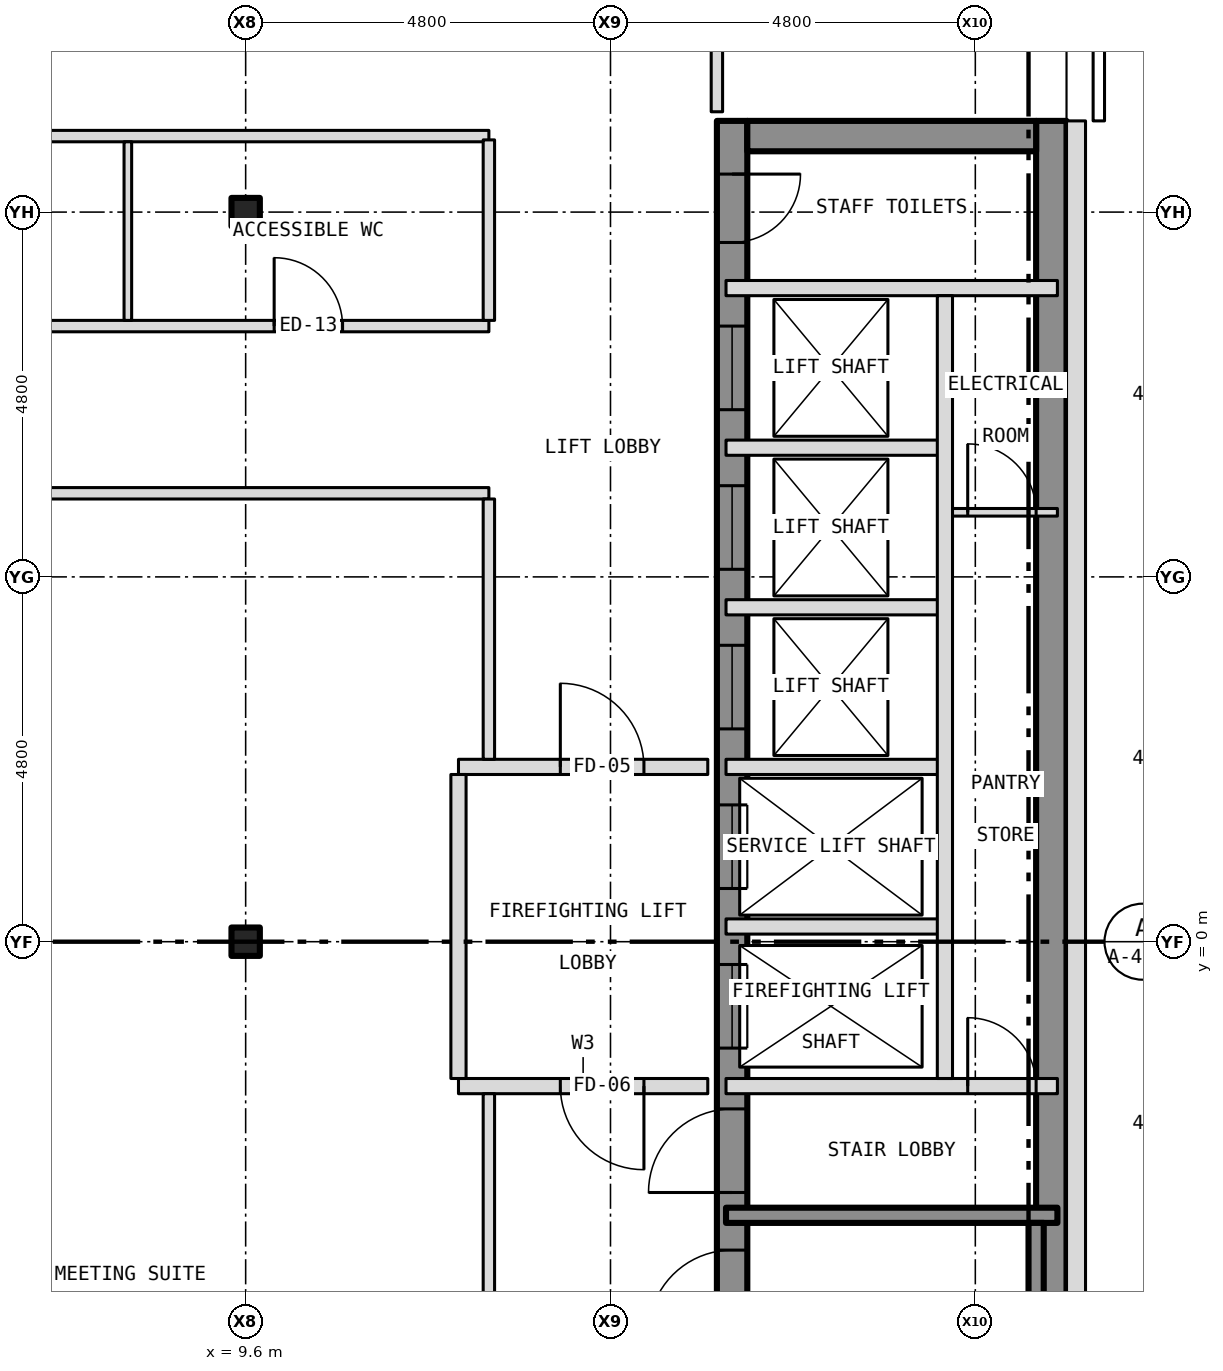
"""IFC4 building model, lengths in metres.
Left out: names, types, materials, properties, quantities, classifications, styles, units other than length and angle.
Written with IfcOpenShell. Run it as: python <this file> out.ifc"""

import sys

from ifc_helpers import new_model, si_unit, direction, frame, frame_2d, origin, origin_2d, place, context, subcontext, project, spatial, rectangle, i_section, extrude, element, fill, save


model = new_model("IFC4")
c1 = context("Model", 3, precision=1e-05, world=origin(), true_north=direction((0.0, 1.0)))
c2 = subcontext(c1, "Body", "Model", "MODEL_VIEW")
j1 = project(units=[si_unit("LENGTHUNIT", "METRE"), si_unit("PLANEANGLEUNIT", "RADIAN")], contexts=[c1])
p1 = place(None, origin())
s1 = spatial("IfcSite", under=j1, at=p1, CompositionType="ELEMENT")
p2 = place(p1, origin())
s2 = spatial("IfcBuilding", under=s1, at=p2, CompositionType="ELEMENT")
p3 = place(p2, frame((0.0, 0.0, 212.0)))
s3 = spatial("IfcBuildingStorey", under=s2, at=p3, CompositionType="ELEMENT", Elevation=212.0)
for number, where, z_axis, x_axis in (
    (1, (9.6, 0.0, -0.15), (0.0, 0.0, 1.0), (1.0, 0.0, 0.0)),
    (2, (9.6, 9.6, -0.15), (0.0, 0.0, 1.0), (1.0, 0.0, 0.0)),
):
    element("IfcColumn", number, at=place(p3, frame(where, z_axis=z_axis, x_axis=x_axis)), inside=s3, PredefinedType="COLUMN", context=c2, shape_type="SweptSolid", body=[
        extrude(i_section(OverallWidth=0.373, OverallDepth=0.373, WebThickness=0.016, FlangeThickness=0.026, at=origin_2d()), origin(), (0.0, 0.0, 1.0), 3.5),
    ])
p4 = place(p3, frame((16.0, -10.8, 0.0), z_axis=(0.0, 0.0, 1.0), x_axis=(0.0, 1.0, 0.0)))
e3 = element("IfcWall", 3, at=p4, inside=s3, PredefinedType="SHEAR", context=c2, shape_type="SweptSolid", body=[
    extrude(rectangle(XDim=21.6, YDim=0.4, at=frame_2d((10.8, 0.0))), origin(), (0.0, 0.0, 1.0), 3.25),
])
p5 = place(p4, frame((9.4, 0.0, 0.0)))
e4 = element("IfcOpeningElement", 4, at=p5, cuts=e3, PredefinedType="OPENING", context=c2, shape_type="SweptSolid", body=[
    extrude(rectangle(XDim=1.1, YDim=2.1, at=frame_2d((0.55, 1.05))), frame((0.0, 0.212, 0.0), z_axis=(0.0, -1.0, 0.0), x_axis=(1.0, 0.0, 0.0)), (0.0, 0.0, 1.0), 0.424),
])
p6 = place(p4, frame((11.5, 0.0, 0.0)))
e5 = element("IfcOpeningElement", 5, at=p6, cuts=e3, PredefinedType="OPENING", context=c2, shape_type="SweptSolid", body=[
    extrude(rectangle(XDim=1.1, YDim=2.1, at=frame_2d((0.55, 1.05))), frame((0.0, 0.212, 0.0), z_axis=(0.0, -1.0, 0.0), x_axis=(1.0, 0.0, 0.0)), (0.0, 0.0, 1.0), 0.424),
])
p7 = place(p4, frame((13.6, 0.0, 0.0)))
e6 = element("IfcOpeningElement", 6, at=p7, cuts=e3, PredefinedType="OPENING", context=c2, shape_type="SweptSolid", body=[
    extrude(rectangle(XDim=1.1, YDim=2.1, at=frame_2d((0.55, 1.05))), frame((0.0, 0.212, 0.0), z_axis=(0.0, -1.0, 0.0), x_axis=(1.0, 0.0, 0.0)), (0.0, 0.0, 1.0), 0.424),
])
p8 = place(p4, frame((15.7, 0.0, 0.0)))
e7 = element("IfcOpeningElement", 7, at=p8, cuts=e3, PredefinedType="OPENING", context=c2, shape_type="SweptSolid", body=[
    extrude(rectangle(XDim=1.1, YDim=2.1, at=frame_2d((0.55, 1.05))), frame((0.0, 0.212, 0.0), z_axis=(0.0, -1.0, 0.0), x_axis=(1.0, 0.0, 0.0)), (0.0, 0.0, 1.0), 0.424),
])
p9 = place(p4, frame((17.8, 0.0, 0.0)))
e8 = element("IfcOpeningElement", 8, at=p9, cuts=e3, PredefinedType="OPENING", context=c2, shape_type="SweptSolid", body=[
    extrude(rectangle(XDim=1.1, YDim=2.1, at=frame_2d((0.55, 1.05))), frame((0.0, 0.212, 0.0), z_axis=(0.0, -1.0, 0.0), x_axis=(1.0, 0.0, 0.0)), (0.0, 0.0, 1.0), 0.424),
])
p10 = place(p4, frame((5.642, 0.0, 0.0)))
e9 = element("IfcOpeningElement", 9, at=p10, cuts=e3, PredefinedType="OPENING", context=c2, shape_type="SweptSolid", body=[
    extrude(rectangle(XDim=1.1, YDim=2.1, at=frame_2d((0.55, 1.05))), frame((0.0, 0.212, 0.0), z_axis=(0.0, -1.0, 0.0), x_axis=(1.0, 0.0, 0.0)), (0.0, 0.0, 1.0), 0.424),
])
p11 = place(p4, frame((7.5, 0.0, 0.0)))
e10 = element("IfcOpeningElement", 10, at=p11, cuts=e3, PredefinedType="OPENING", context=c2, shape_type="SweptSolid", body=[
    extrude(rectangle(XDim=1.1, YDim=2.1, at=frame_2d((0.55, 1.05))), frame((0.0, 0.212, 0.0), z_axis=(0.0, -1.0, 0.0), x_axis=(1.0, 0.0, 0.0)), (0.0, 0.0, 1.0), 0.424),
])
p12 = place(p4, frame((20.0, 0.0, 0.0)))
e11 = element("IfcOpeningElement", 11, at=p12, cuts=e3, PredefinedType="OPENING", context=c2, shape_type="SweptSolid", body=[
    extrude(rectangle(XDim=0.9, YDim=2.1, at=frame_2d((0.45, 1.05))), frame((0.0, 0.212, 0.0), z_axis=(0.0, -1.0, 0.0), x_axis=(1.0, 0.0, 0.0)), (0.0, 0.0, 1.0), 0.424),
])
p13 = place(p3, frame((20.2, -10.8, 0.0), z_axis=(0.0, 0.0, 1.0), x_axis=(0.0, 1.0, 0.0)))
e12 = element("IfcWall", 12, at=p13, inside=s3, PredefinedType="SHEAR", context=c2, shape_type="SweptSolid", body=[
    extrude(rectangle(XDim=21.6, YDim=0.4, at=frame_2d((10.8, 0.0))), origin(), (0.0, 0.0, 1.0), 3.25),
])
p14 = place(p3, frame((16.2, 10.6, 0.0), z_axis=(0.0, 0.0, 1.0), x_axis=(1.0, 0.0, 0.0)))
e13 = element("IfcWall", 13, at=p14, inside=s3, PredefinedType="SHEAR", context=c2, shape_type="SweptSolid", body=[
    extrude(rectangle(XDim=3.8, YDim=0.4, at=frame_2d((1.9, 0.0))), origin(), (0.0, 0.0, 1.0), 3.25),
])
p15 = place(p3, frame((20.525, -10.8, 0.0), z_axis=(0.0, 0.0, 1.0), x_axis=(0.0, 1.0, 0.0)))
e14 = element("IfcWall", 14, at=p15, inside=s3, PredefinedType="SOLIDWALL", context=c2, shape_type="SweptSolid", body=[
    extrude(rectangle(XDim=21.6, YDim=0.25, at=frame_2d((10.8, 0.0))), origin(), (0.0, 0.0, 1.0), 3.5),
])
p16 = place(p15, frame((2.95, 0.0, 1.0)))
e15 = element("IfcOpeningElement", 15, at=p16, cuts=e14, PredefinedType="OPENING", context=c2, shape_type="SweptSolid", body=[
    extrude(rectangle(XDim=0.6, YDim=1.5, at=frame_2d((0.3, 0.75))), frame((0.0, 0.137, 0.0), z_axis=(0.0, -1.0, 0.0), x_axis=(1.0, 0.0, 0.0)), (0.0, 0.0, 1.0), 0.274),
])
p17 = place(p3, frame((15.92, -3.6, 0.0), z_axis=(0.0, 0.0, 1.0), x_axis=(1.0, 0.0, 0.0)))
e16 = element("IfcWall", 16, at=p17, inside=s3, PredefinedType="SHEAR", context=c2, shape_type="SweptSolid", body=[
    extrude(rectangle(XDim=4.36, YDim=0.2, at=frame_2d((2.18, 0.0))), origin(), (0.0, 0.0, 1.0), 3.25),
])
p18 = place(p3, frame((12.4, -1.9, 0.0), z_axis=(0.0, 0.0, 1.0), x_axis=(1.0, 0.0, 0.0)))
e17 = element("IfcWall", 17, at=p18, inside=s3, PredefinedType="PARTITIONING", context=c2, shape_type="SweptSolid", body=[
    extrude(rectangle(XDim=3.28, YDim=0.2, at=frame_2d((1.64, 0.0))), origin(), (0.0, 0.0, 1.0), 3.35),
])
p19 = place(p18, frame((1.34, 0.0, 0.0)))
e18 = element("IfcOpeningElement", 18, at=p19, cuts=e17, PredefinedType="OPENING", context=c2, shape_type="SweptSolid", body=[
    extrude(rectangle(XDim=1.1, YDim=2.1, at=frame_2d((0.55, 1.05))), frame((0.0, 0.112, 0.0), z_axis=(0.0, -1.0, 0.0), x_axis=(1.0, 0.0, 0.0)), (0.0, 0.0, 1.0), 0.224),
])
p20 = place(p3, frame((15.92, -1.9, 0.0), z_axis=(0.0, 0.0, 1.0), x_axis=(1.0, 0.0, 0.0)))
e19 = element("IfcWall", 19, at=p20, inside=s3, PredefinedType="PARTITIONING", context=c2, shape_type="SweptSolid", body=[
    extrude(rectangle(XDim=4.36, YDim=0.2, at=frame_2d((2.18, 0.0))), origin(), (0.0, 0.0, 1.0), 3.25),
])
p21 = place(p20, frame((3.18, 0.0, 0.0)))
e20 = element("IfcOpeningElement", 20, at=p21, cuts=e19, PredefinedType="OPENING", context=c2, shape_type="SweptSolid", body=[
    extrude(rectangle(XDim=0.9, YDim=2.1, at=frame_2d((0.45, 1.05))), frame((0.0, 0.112, 0.0), z_axis=(0.0, -1.0, 0.0), x_axis=(1.0, 0.0, 0.0)), (0.0, 0.0, 1.0), 0.224),
])
p22 = place(p3, frame((15.92, 0.2, 0.0), z_axis=(0.0, 0.0, 1.0), x_axis=(1.0, 0.0, 0.0)))
e21 = element("IfcWall", 21, at=p22, inside=s3, PredefinedType="PARTITIONING", context=c2, shape_type="SweptSolid", body=[
    extrude(rectangle(XDim=2.88, YDim=0.2, at=frame_2d((1.44, 0.0))), origin(), (0.0, 0.0, 1.0), 3.25),
])
p23 = place(p3, frame((12.4, 2.3, 0.0), z_axis=(0.0, 0.0, 1.0), x_axis=(1.0, 0.0, 0.0)))
e22 = element("IfcWall", 22, at=p23, inside=s3, PredefinedType="PARTITIONING", context=c2, shape_type="SweptSolid", body=[
    extrude(rectangle(XDim=3.28, YDim=0.2, at=frame_2d((1.64, 0.0))), origin(), (0.0, 0.0, 1.0), 3.35),
])
p24 = place(p23, frame((1.34, 0.0, 0.0)))
e23 = element("IfcOpeningElement", 23, at=p24, cuts=e22, PredefinedType="OPENING", context=c2, shape_type="SweptSolid", body=[
    extrude(rectangle(XDim=1.1, YDim=2.1, at=frame_2d((0.55, 1.05))), frame((0.0, 0.112, 0.0), z_axis=(0.0, -1.0, 0.0), x_axis=(1.0, 0.0, 0.0)), (0.0, 0.0, 1.0), 0.224),
])
for number, where, z_axis, x_axis in (
    (24, (15.92, 2.3, 0.0), (0.0, 0.0, 1.0), (1.0, 0.0, 0.0)),
    (25, (15.92, 4.4, 0.0), (0.0, 0.0, 1.0), (1.0, 0.0, 0.0)),
):
    element("IfcWall", number, at=place(p3, frame(where, z_axis=z_axis, x_axis=x_axis)), inside=s3, PredefinedType="PARTITIONING", context=c2, shape_type="SweptSolid", body=[
        extrude(rectangle(XDim=2.88, YDim=0.2, at=frame_2d((1.44, 0.0))), origin(), (0.0, 0.0, 1.0), 3.25),
    ])
p25 = place(p3, frame((18.8, 5.65, 0.0), z_axis=(0.0, 0.0, 1.0), x_axis=(1.0, 0.0, 0.0)))
e26 = element("IfcWall", 26, at=p25, inside=s3, PredefinedType="PARTITIONING", context=c2, shape_type="SweptSolid", body=[
    extrude(rectangle(XDim=1.48, YDim=0.1, at=frame_2d((0.74, 0.0))), origin(), (0.0, 0.0, 1.0), 3.25),
])
p26 = place(p25, frame((0.3, 0.0, 0.0)))
e27 = element("IfcOpeningElement", 27, at=p26, cuts=e26, PredefinedType="OPENING", context=c2, shape_type="SweptSolid", body=[
    extrude(rectangle(XDim=0.9, YDim=2.1, at=frame_2d((0.45, 1.05))), frame((0.0, 0.062, 0.0), z_axis=(0.0, -1.0, 0.0), x_axis=(1.0, 0.0, 0.0)), (0.0, 0.0, 1.0), 0.124),
])
p27 = place(p3, frame((3.3, 5.9, 0.0), z_axis=(0.0, 0.0, 1.0), x_axis=(1.0, 0.0, 0.0)))
e28 = element("IfcWall", 28, at=p27, inside=s3, PredefinedType="PARTITIONING", context=c2, shape_type="SweptSolid", body=[
    extrude(rectangle(XDim=9.5, YDim=0.15, at=frame_2d((4.75, 0.0))), origin(), (0.0, 0.0, 1.0), 3.35),
])
p28 = place(p3, frame((15.92, 6.5, 0.0), z_axis=(0.0, 0.0, 1.0), x_axis=(1.0, 0.0, 0.0)))
e29 = element("IfcWall", 29, at=p28, inside=s3, PredefinedType="PARTITIONING", context=c2, shape_type="SweptSolid", body=[
    extrude(rectangle(XDim=2.88, YDim=0.2, at=frame_2d((1.44, 0.0))), origin(), (0.0, 0.0, 1.0), 3.25),
])
p29 = place(p3, frame((3.3, 8.1, 0.0), z_axis=(0.0, 0.0, 1.0), x_axis=(1.0, 0.0, 0.0)))
e30 = element("IfcWall", 30, at=p29, inside=s3, PredefinedType="PARTITIONING", context=c2, shape_type="SweptSolid", body=[
    extrude(rectangle(XDim=9.5, YDim=0.15, at=frame_2d((4.75, 0.0))), origin(), (0.0, 0.0, 1.0), 3.35),
])
p30 = place(p29, frame((6.675, 0.0, 0.0)))
e31 = element("IfcOpeningElement", 31, at=p30, cuts=e30, PredefinedType="OPENING", context=c2, shape_type="SweptSolid", body=[
    extrude(rectangle(XDim=0.9, YDim=2.1, at=frame_2d((0.45, 1.05))), frame((0.0, 0.087, 0.0), z_axis=(0.0, -1.0, 0.0), x_axis=(1.0, 0.0, 0.0)), (0.0, 0.0, 1.0), 0.174),
])
p31 = place(p3, frame((15.92, 8.6, 0.0), z_axis=(0.0, 0.0, 1.0), x_axis=(1.0, 0.0, 0.0)))
e32 = element("IfcWall", 32, at=p31, inside=s3, PredefinedType="PARTITIONING", context=c2, shape_type="SweptSolid", body=[
    extrude(rectangle(XDim=4.36, YDim=0.2, at=frame_2d((2.18, 0.0))), origin(), (0.0, 0.0, 1.0), 3.25),
])
p32 = place(p3, frame((3.3, 10.6, 0.0), z_axis=(0.0, 0.0, 1.0), x_axis=(1.0, 0.0, 0.0)))
e33 = element("IfcWall", 33, at=p32, inside=s3, PredefinedType="PARTITIONING", context=c2, shape_type="SweptSolid", body=[
    extrude(rectangle(XDim=9.5, YDim=0.15, at=frame_2d((4.75, 0.0))), origin(), (0.0, 0.0, 1.0), 3.35),
])
p33 = place(p32, frame((1.925, 0.0, 0.0)))
e34 = element("IfcOpeningElement", 34, at=p33, cuts=e33, PredefinedType="OPENING", context=c2, shape_type="SweptSolid", body=[
    extrude(rectangle(XDim=0.9, YDim=2.1, at=frame_2d((0.45, 1.05))), frame((0.0, 0.087, 0.0), z_axis=(0.0, -1.0, 0.0), x_axis=(1.0, 0.0, 0.0)), (0.0, 0.0, 1.0), 0.174),
])
p34 = place(p3, frame((8.05, 8.175, 0.0), z_axis=(0.0, 0.0, 1.0), x_axis=(0.0, 1.0, 0.0)))
e35 = element("IfcWall", 35, at=p34, inside=s3, PredefinedType="PARTITIONING", context=c2, shape_type="SweptSolid", body=[
    extrude(rectangle(XDim=2.35, YDim=0.1, at=frame_2d((1.175, 0.0))), origin(), (0.0, 0.0, 1.0), 3.35),
])
p35 = place(p3, frame((12.4, -1.8, 0.0), z_axis=(0.0, 0.0, 1.0), x_axis=(0.0, 1.0, 0.0)))
e36 = element("IfcWall", 36, at=p35, inside=s3, PredefinedType="PARTITIONING", context=c2, shape_type="SweptSolid", body=[
    extrude(rectangle(XDim=4.0, YDim=0.2, at=frame_2d((2.0, 0.0))), origin(), (0.0, 0.0, 1.0), 3.35),
])
p36 = place(p3, frame((12.8, -10.525, 0.0), z_axis=(0.0, 0.0, 1.0), x_axis=(0.0, 1.0, 0.0)))
e37 = element("IfcWall", 37, at=p36, inside=s3, PredefinedType="PARTITIONING", context=c2, shape_type="SweptSolid", body=[
    extrude(rectangle(XDim=8.525, YDim=0.15, at=frame_2d((4.262, 0.0))), origin(), (0.0, 0.0, 1.0), 3.35),
])
p37 = place(p3, frame((12.8, 2.4, 0.0), z_axis=(0.0, 0.0, 1.0), x_axis=(0.0, 1.0, 0.0)))
e38 = element("IfcWall", 38, at=p37, inside=s3, PredefinedType="PARTITIONING", context=c2, shape_type="SweptSolid", body=[
    extrude(rectangle(XDim=3.425, YDim=0.15, at=frame_2d((1.712, 0.0))), origin(), (0.0, 0.0, 1.0), 3.35),
])
p38 = place(p3, frame((12.8, 8.175, 0.0), z_axis=(0.0, 0.0, 1.0), x_axis=(0.0, 1.0, 0.0)))
e39 = element("IfcWall", 39, at=p38, inside=s3, PredefinedType="PARTITIONING", context=c2, shape_type="SweptSolid", body=[
    extrude(rectangle(XDim=2.375, YDim=0.15, at=frame_2d((1.188, 0.0))), origin(), (0.0, 0.0, 1.0), 3.35),
])
p39 = place(p3, frame((15.8, 10.92, 0.0), z_axis=(0.0, 0.0, 1.0), x_axis=(0.0, 1.0, 0.0)))
e40 = element("IfcWall", 40, at=p39, inside=s3, PredefinedType="PARTITIONING", context=c2, shape_type="SweptSolid", body=[
    extrude(rectangle(XDim=1.805, YDim=0.15, at=frame_2d((0.903, 0.0))), origin(), (0.0, 0.0, 1.0), 3.35),
])
p40 = place(p3, frame((18.8, -1.8, 0.0), z_axis=(0.0, 0.0, 1.0), x_axis=(0.0, 1.0, 0.0)))
e41 = element("IfcWall", 41, at=p40, inside=s3, PredefinedType="PARTITIONING", context=c2, shape_type="SweptSolid", body=[
    extrude(rectangle(XDim=10.3, YDim=0.2, at=frame_2d((5.15, 0.0))), origin(), (0.0, 0.0, 1.0), 3.25),
])
p41 = place(p3, frame((20.0, -10.68, 0.0), z_axis=(0.0, 0.0, 1.0), x_axis=(0.0, 1.0, 0.0)))
e42 = element("IfcWall", 42, at=p41, inside=s3, PredefinedType="SHEAR", context=c2, shape_type="SweptSolid", body=[
    extrude(rectangle(XDim=6.98, YDim=0.2, at=frame_2d((3.49, 0.0))), origin(), (0.0, 0.0, 1.0), 3.25),
])
p42 = place(p5, origin())
e43 = element("IfcDoor", 43, at=p42, inside=s3, OperationType="SLIDING_TO_LEFT", PredefinedType="DOOR", context=c2, shape_type="SweptSolid", body=[
    extrude(rectangle(XDim=1.1, YDim=2.1, at=frame_2d((0.55, 1.05))), frame((0.0, 0.025, 0.0), z_axis=(0.0, -1.0, 0.0), x_axis=(1.0, 0.0, 0.0)), (0.0, 0.0, 1.0), 0.05),
])
fill(e4, e43)
p43 = place(p6, origin())
e44 = element("IfcDoor", 44, at=p43, inside=s3, OperationType="SLIDING_TO_LEFT", PredefinedType="DOOR", context=c2, shape_type="SweptSolid", body=[
    extrude(rectangle(XDim=1.1, YDim=2.1, at=frame_2d((0.55, 1.05))), frame((0.0, 0.025, 0.0), z_axis=(0.0, -1.0, 0.0), x_axis=(1.0, 0.0, 0.0)), (0.0, 0.0, 1.0), 0.05),
])
fill(e5, e44)
p44 = place(p7, origin())
e45 = element("IfcDoor", 45, at=p44, inside=s3, OperationType="SLIDING_TO_LEFT", PredefinedType="DOOR", context=c2, shape_type="SweptSolid", body=[
    extrude(rectangle(XDim=1.1, YDim=2.1, at=frame_2d((0.55, 1.05))), frame((0.0, 0.025, 0.0), z_axis=(0.0, -1.0, 0.0), x_axis=(1.0, 0.0, 0.0)), (0.0, 0.0, 1.0), 0.05),
])
fill(e6, e45)
p45 = place(p8, origin())
e46 = element("IfcDoor", 46, at=p45, inside=s3, OperationType="SLIDING_TO_LEFT", PredefinedType="DOOR", context=c2, shape_type="SweptSolid", body=[
    extrude(rectangle(XDim=1.1, YDim=2.1, at=frame_2d((0.55, 1.05))), frame((0.0, 0.025, 0.0), z_axis=(0.0, -1.0, 0.0), x_axis=(1.0, 0.0, 0.0)), (0.0, 0.0, 1.0), 0.05),
])
fill(e7, e46)
p46 = place(p9, origin())
e47 = element("IfcDoor", 47, at=p46, inside=s3, OperationType="SLIDING_TO_LEFT", PredefinedType="DOOR", context=c2, shape_type="SweptSolid", body=[
    extrude(rectangle(XDim=1.1, YDim=2.1, at=frame_2d((0.55, 1.05))), frame((0.0, 0.025, 0.0), z_axis=(0.0, -1.0, 0.0), x_axis=(1.0, 0.0, 0.0)), (0.0, 0.0, 1.0), 0.05),
])
fill(e8, e47)
p47 = place(p10, origin())
e48 = element("IfcDoor", 48, at=p47, inside=s3, OperationType="SINGLE_SWING_LEFT", PredefinedType="DOOR", context=c2, shape_type="SweptSolid", body=[
    extrude(rectangle(XDim=1.1, YDim=2.1, at=frame_2d((0.55, 1.05))), frame((0.0, 0.025, 0.0), z_axis=(0.0, -1.0, 0.0), x_axis=(1.0, 0.0, 0.0)), (0.0, 0.0, 1.0), 0.05),
])
fill(e9, e48)
p48 = place(p11, origin())
e49 = element("IfcDoor", 49, at=p48, inside=s3, OperationType="SINGLE_SWING_LEFT", PredefinedType="DOOR", context=c2, shape_type="SweptSolid", body=[
    extrude(rectangle(XDim=1.1, YDim=2.1, at=frame_2d((0.55, 1.05))), frame((0.0, 0.025, 0.0), z_axis=(0.0, -1.0, 0.0), x_axis=(1.0, 0.0, 0.0)), (0.0, 0.0, 1.0), 0.05),
])
fill(e10, e49)
p49 = place(p12, origin())
e50 = element("IfcDoor", 50, at=p49, inside=s3, OperationType="SINGLE_SWING_RIGHT", PredefinedType="DOOR", context=c2, shape_type="SweptSolid", body=[
    extrude(rectangle(XDim=0.9, YDim=2.1, at=frame_2d((0.45, 1.05))), frame((0.0, 0.025, 0.0), z_axis=(0.0, -1.0, 0.0), x_axis=(1.0, 0.0, 0.0)), (0.0, 0.0, 1.0), 0.05),
])
fill(e11, e50)
p50 = place(p21, origin())
e51 = element("IfcDoor", 51, at=p50, inside=s3, OperationType="SINGLE_SWING_LEFT", PredefinedType="DOOR", context=c2, shape_type="SweptSolid", body=[
    extrude(rectangle(XDim=0.9, YDim=2.1, at=frame_2d((0.45, 1.05))), frame((0.0, 0.025, 0.0), z_axis=(0.0, -1.0, 0.0), x_axis=(1.0, 0.0, 0.0)), (0.0, 0.0, 1.0), 0.05),
])
fill(e20, e51)
p51 = place(p26, origin())
e52 = element("IfcDoor", 52, at=p51, inside=s3, OperationType="SINGLE_SWING_LEFT", PredefinedType="DOOR", context=c2, shape_type="SweptSolid", body=[
    extrude(rectangle(XDim=0.9, YDim=2.1, at=frame_2d((0.45, 1.05))), frame((0.0, 0.025, 0.0), z_axis=(0.0, -1.0, 0.0), x_axis=(1.0, 0.0, 0.0)), (0.0, 0.0, 1.0), 0.05),
])
fill(e27, e52)
p52 = place(p24, origin())
e53 = element("IfcDoor", 53, at=p52, inside=s3, OperationType="SINGLE_SWING_LEFT", PredefinedType="DOOR", context=c2, shape_type="SweptSolid", body=[
    extrude(rectangle(XDim=1.1, YDim=2.1, at=frame_2d((0.55, 1.05))), frame((0.0, 0.025, 0.0), z_axis=(0.0, -1.0, 0.0), x_axis=(1.0, 0.0, 0.0)), (0.0, 0.0, 1.0), 0.05),
])
fill(e23, e53)
p53 = place(p19, origin())
e54 = element("IfcDoor", 54, at=p53, inside=s3, OperationType="SINGLE_SWING_RIGHT", PredefinedType="DOOR", context=c2, shape_type="SweptSolid", body=[
    extrude(rectangle(XDim=1.1, YDim=2.1, at=frame_2d((0.55, 1.05))), frame((0.0, 0.025, 0.0), z_axis=(0.0, -1.0, 0.0), x_axis=(1.0, 0.0, 0.0)), (0.0, 0.0, 1.0), 0.05),
])
fill(e18, e54)
p54 = place(p30, origin())
e55 = element("IfcDoor", 55, at=p54, inside=s3, OperationType="SINGLE_SWING_LEFT", PredefinedType="DOOR", context=c2, shape_type="SweptSolid", body=[
    extrude(rectangle(XDim=0.9, YDim=2.1, at=frame_2d((0.45, 1.05))), frame((0.0, 0.025, 0.0), z_axis=(0.0, -1.0, 0.0), x_axis=(1.0, 0.0, 0.0)), (0.0, 0.0, 1.0), 0.05),
])
fill(e31, e55)
save(model, sys.argv[1])
